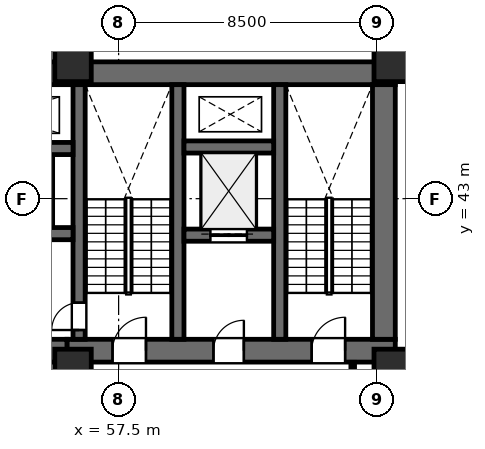
"""IFC4 building model, lengths in metres.
Left out: names, types, materials, properties, quantities, classifications, styles, units other than length and angle.
Written with IfcOpenShell. Run it as: python <this file> out.ifc"""

import sys

from ifc_helpers import new_model, si_unit, direction, frame, frame_2d, origin, origin_2d, place, context, subcontext, project, spatial, rectangle, extrude, element, fill, save


model = new_model("IFC4")
c1 = context("Model", 3, precision=1e-05, world=origin(), true_north=direction((0.0, 1.0)))
c2 = subcontext(c1, "Body", "Model", "MODEL_VIEW")
j1 = project(units=[si_unit("LENGTHUNIT", "METRE"), si_unit("PLANEANGLEUNIT", "RADIAN")], contexts=[c1])
p1 = place(None, origin())
s1 = spatial("IfcSite", under=j1, at=p1, CompositionType="ELEMENT")
p2 = place(p1, origin())
s2 = spatial("IfcBuilding", under=s1, at=p2, CompositionType="ELEMENT")
p3 = place(p2, frame((0.0, 0.0, 61.5)))
s3 = spatial("IfcBuildingStorey", under=s2, at=p3, CompositionType="ELEMENT", Elevation=61.5)
p4 = place(p3, frame((22.9, 47.125, 0.0), z_axis=(0.0, 0.0, 1.0), x_axis=(1.0, 0.0, 0.0)))
e1 = element("IfcWall", 1, at=p4, inside=s3, PredefinedType="SHEAR", context=c2, shape_type="SweptSolid", body=[
    extrude(rectangle(XDim=43.7, YDim=0.75, at=frame_2d((21.85, 0.0))), origin(), (0.0, 0.0, 1.0), 4.0),
])
p5 = place(p3, frame((55.8, 38.0, 0.0), z_axis=(0.0, 0.0, 1.0), x_axis=(1.0, 0.0, 0.0)))
e2 = element("IfcWall", 2, at=p5, inside=s3, PredefinedType="SHEAR", context=c2, shape_type="SweptSolid", body=[
    extrude(rectangle(XDim=10.8, YDim=0.75, at=frame_2d((5.4, 0.0))), origin(), (0.0, 0.0, 1.0), 4.0),
])
p6 = place(p5, frame((1.5, 0.0, 0.0)))
e3 = element("IfcOpeningElement", 3, at=p6, cuts=e2, PredefinedType="OPENING", context=c2, shape_type="SweptSolid", body=[
    extrude(rectangle(XDim=1.1, YDim=2.2, at=frame_2d((0.55, 1.1))), frame((0.0, 0.385, 0.0), z_axis=(0.0, -1.0, 0.0), x_axis=(1.0, 0.0, 0.0)), (0.0, 0.0, 1.0), 0.77),
])
p7 = place(p5, frame((4.82, 0.0, 0.0)))
e4 = element("IfcOpeningElement", 4, at=p7, cuts=e2, PredefinedType="OPENING", context=c2, shape_type="SweptSolid", body=[
    extrude(rectangle(XDim=1.0, YDim=2.15, at=frame_2d((0.5, 1.075))), frame((0.0, 0.385, 0.0), z_axis=(0.0, -1.0, 0.0), x_axis=(1.0, 0.0, 0.0)), (0.0, 0.0, 1.0), 0.77),
])
p8 = place(p5, frame((8.05, 0.0, 0.0)))
e5 = element("IfcOpeningElement", 5, at=p8, cuts=e2, PredefinedType="OPENING", context=c2, shape_type="SweptSolid", body=[
    extrude(rectangle(XDim=1.1, YDim=2.2, at=frame_2d((0.55, 1.1))), frame((0.0, 0.385, 0.0), z_axis=(0.0, -1.0, 0.0), x_axis=(1.0, 0.0, 0.0)), (0.0, 0.0, 1.0), 0.77),
])
p9 = place(p3, frame((66.225, 38.375, 0.0), z_axis=(0.0, 0.0, 1.0), x_axis=(0.0, 1.0, 0.0)))
e6 = element("IfcWall", 6, at=p9, inside=s3, PredefinedType="SHEAR", context=c2, shape_type="SweptSolid", body=[
    extrude(rectangle(XDim=8.375, YDim=0.75, at=frame_2d((4.188, 0.0))), origin(), (0.0, 0.0, 1.0), 4.0),
])
for number, where, z_axis, x_axis in (
    (7, (62.8, 38.375, 0.0), (0.0, 0.0, 1.0), (0.0, 1.0, 0.0)),
    (8, (59.45, 38.375, 0.0), (0.0, 0.0, 1.0), (0.0, 1.0, 0.0)),
):
    element("IfcWall", number, at=place(p3, frame(where, z_axis=z_axis, x_axis=x_axis)), inside=s3, PredefinedType="SHEAR", context=c2, shape_type="SweptSolid", body=[
        extrude(rectangle(XDim=8.375, YDim=0.4, at=frame_2d((4.188, 0.0))), origin(), (0.0, 0.0, 1.0), 4.0),
    ])
p10 = place(p3, frame((56.2, 38.375, 0.0), z_axis=(0.0, 0.0, 1.0), x_axis=(0.0, 1.0, 0.0)))
e9 = element("IfcWall", 9, at=p10, inside=s3, PredefinedType="SHEAR", context=c2, shape_type="SweptSolid", body=[
    extrude(rectangle(XDim=8.375, YDim=0.4, at=frame_2d((4.188, 0.0))), origin(), (0.0, 0.0, 1.0), 4.0),
])
p11 = place(p10, frame((0.305, 0.0, 0.0)))
e10 = element("IfcOpeningElement", 10, at=p11, cuts=e9, PredefinedType="OPENING", context=c2, shape_type="SweptSolid", body=[
    extrude(rectangle(XDim=0.9, YDim=2.15, at=frame_2d((0.45, 1.075))), frame((0.0, 0.21, 0.0), z_axis=(0.0, -1.0, 0.0), x_axis=(1.0, 0.0, 0.0)), (0.0, 0.0, 1.0), 0.42),
])
p12 = place(p3, frame((59.65, 41.8, 0.0), z_axis=(0.0, 0.0, 1.0), x_axis=(1.0, 0.0, 0.0)))
e11 = element("IfcWall", 11, at=p12, inside=s3, PredefinedType="SHEAR", context=c2, shape_type="SweptSolid", body=[
    extrude(rectangle(XDim=2.95, YDim=0.4, at=frame_2d((1.475, 0.0))), origin(), (0.0, 0.0, 1.0), 4.0),
])
p13 = place(p12, frame((0.87, 0.0, 0.0)))
e12 = element("IfcOpeningElement", 12, at=p13, cuts=e11, PredefinedType="OPENING", context=c2, shape_type="SweptSolid", body=[
    extrude(rectangle(XDim=1.2, YDim=2.2, at=frame_2d((0.6, 1.1))), frame((0.0, 0.21, 0.0), z_axis=(0.0, -1.0, 0.0), x_axis=(1.0, 0.0, 0.0)), (0.0, 0.0, 1.0), 0.42),
])
p14 = place(p3, frame((59.65, 44.7, 0.0), z_axis=(0.0, 0.0, 1.0), x_axis=(1.0, 0.0, 0.0)))
e13 = element("IfcWall", 13, at=p14, inside=s3, PredefinedType="SHEAR", context=c2, shape_type="SweptSolid", body=[
    extrude(rectangle(XDim=2.95, YDim=0.4, at=frame_2d((1.475, 0.0))), origin(), (0.0, 0.0, 1.0), 4.0),
])
p15 = place(p3, frame((50.8, 38.0, 0.0), z_axis=(0.0, 0.0, 1.0), x_axis=(1.0, 0.0, 0.0)))
e14 = element("IfcWall", 14, at=p15, inside=s3, PredefinedType="SHEAR", context=c2, shape_type="SweptSolid", body=[
    extrude(rectangle(XDim=5.0, YDim=0.75, at=frame_2d((2.5, 0.0))), origin(), (0.0, 0.0, 1.0), 4.0),
])
p16 = place(p15, frame((2.0, 0.0, 0.0)))
e15 = element("IfcOpeningElement", 15, at=p16, cuts=e14, PredefinedType="OPENING", context=c2, shape_type="SweptSolid", body=[
    extrude(rectangle(XDim=1.2, YDim=2.2, at=frame_2d((0.6, 1.1))), frame((0.0, 0.385, 0.0), z_axis=(0.0, -1.0, 0.0), x_axis=(1.0, 0.0, 0.0)), (0.0, 0.0, 1.0), 0.77),
])
p17 = place(p3, frame((51.25, 41.85, 0.0), z_axis=(0.0, 0.0, 1.0), x_axis=(1.0, 0.0, 0.0)))
e16 = element("IfcWall", 16, at=p17, inside=s3, PredefinedType="SHEAR", context=c2, shape_type="SweptSolid", body=[
    extrude(rectangle(XDim=4.75, YDim=0.4, at=frame_2d((2.375, 0.0))), origin(), (0.0, 0.0, 1.0), 4.0),
])
p18 = place(p17, frame((0.5, 0.0, 0.0)))
e17 = element("IfcOpeningElement", 17, at=p18, cuts=e16, PredefinedType="OPENING", context=c2, shape_type="SweptSolid", body=[
    extrude(rectangle(XDim=1.2, YDim=2.2, at=frame_2d((0.6, 1.1))), frame((0.0, 0.21, 0.0), z_axis=(0.0, -1.0, 0.0), x_axis=(1.0, 0.0, 0.0)), (0.0, 0.0, 1.0), 0.42),
])
p19 = place(p17, frame((2.6, 0.0, 0.0)))
e18 = element("IfcOpeningElement", 18, at=p19, cuts=e16, PredefinedType="OPENING", context=c2, shape_type="SweptSolid", body=[
    extrude(rectangle(XDim=1.2, YDim=2.2, at=frame_2d((0.6, 1.1))), frame((0.0, 0.21, 0.0), z_axis=(0.0, -1.0, 0.0), x_axis=(1.0, 0.0, 0.0)), (0.0, 0.0, 1.0), 0.42),
])
p20 = place(p3, frame((51.25, 44.65, 0.0), z_axis=(0.0, 0.0, 1.0), x_axis=(1.0, 0.0, 0.0)))
e19 = element("IfcWall", 19, at=p20, inside=s3, PredefinedType="SHEAR", context=c2, shape_type="SweptSolid", body=[
    extrude(rectangle(XDim=4.75, YDim=0.4, at=frame_2d((2.375, 0.0))), origin(), (0.0, 0.0, 1.0), 4.0),
])
for number, where, z_axis, x_axis in (
    (20, (66.5, 47.55, 0.0), (0.0, 0.0, 1.0), (1.0, 0.0, 0.0)),
    (21, (56.0, 47.55, 0.0), (0.0, 0.0, 1.0), (1.0, 0.0, 0.0)),
    (22, (66.5, 37.35, 0.0), (0.0, 0.0, 1.0), (1.0, 0.0, 0.0)),
    (23, (56.0, 37.35, 0.0), (0.0, 0.0, 1.0), (1.0, 0.0, 0.0)),
):
    element("IfcColumn", number, at=place(p3, frame(where, z_axis=z_axis, x_axis=x_axis)), inside=s3, PredefinedType="COLUMN", context=c2, shape_type="SweptSolid", body=[
        extrude(rectangle(XDim=1.2, YDim=1.4, at=origin_2d()), origin(), (0.0, 0.0, 1.0), 4.0),
    ])
p21 = place(p3, frame((68.375, 37.8, 0.0), z_axis=(0.0, 0.0, 1.0), x_axis=(-0.139174610616, -0.990267856572, 0.0)))
e24 = element("IfcWall", 24, at=p21, inside=s3, PredefinedType="STANDARD", context=c2, shape_type="SweptSolid", body=[
    extrude(rectangle(XDim=34.6, YDim=0.28, at=frame_2d((17.3, 0.0))), origin(), (0.0, 0.0, 1.0), 3.74),
])
p22 = place(p21, frame((8.935, 0.0, 0.0)))
e25 = element("IfcOpeningElement", 25, at=p22, cuts=e24, PredefinedType="OPENING", context=c2, shape_type="SweptSolid", body=[
    extrude(rectangle(XDim=1.0, YDim=2.15, at=frame_2d((0.5, 1.075))), frame((0.0, 0.15, 0.0), z_axis=(0.0, -1.0, 0.0), x_axis=(1.0, 0.0, 0.0)), (0.0, 0.0, 1.0), 0.3),
])
p23 = place(p21, frame((4.333, 0.0, 0.65)))
e26 = element("IfcOpeningElement", 26, at=p23, cuts=e24, PredefinedType="OPENING", context=c2, shape_type="SweptSolid", body=[
    extrude(rectangle(XDim=1.8, YDim=2.1, at=frame_2d((0.9, 1.05))), frame((0.0, 0.15, 0.0), z_axis=(0.0, -1.0, 0.0), x_axis=(1.0, 0.0, 0.0)), (0.0, 0.0, 1.0), 0.3),
])
p24 = place(p21, frame((22.104, 0.0, 0.65)))
e27 = element("IfcOpeningElement", 27, at=p24, cuts=e24, PredefinedType="OPENING", context=c2, shape_type="SweptSolid", body=[
    extrude(rectangle(XDim=1.8, YDim=2.1, at=frame_2d((0.9, 1.05))), frame((0.0, 0.15, 0.0), z_axis=(0.0, -1.0, 0.0), x_axis=(1.0, 0.0, 0.0)), (0.0, 0.0, 1.0), 0.3),
])
p25 = place(p3, frame((65.2, 34.4, 0.0), z_axis=(0.0, 0.0, 1.0), x_axis=(0.0, 1.0, 0.0)))
e28 = element("IfcWall", 28, at=p25, inside=s3, PredefinedType="PARTITIONING", context=c2, shape_type="SweptSolid", body=[
    extrude(rectangle(XDim=3.217, YDim=0.12, at=frame_2d((1.608, 0.0))), origin(), (0.0, 0.0, 1.0), 2.813),
])
p26 = place(p6, origin())
e29 = element("IfcDoor", 29, at=p26, inside=s3, OperationType="SINGLE_SWING_RIGHT", PredefinedType="DOOR", context=c2, shape_type="SweptSolid", body=[
    extrude(rectangle(XDim=1.1, YDim=2.2, at=frame_2d((0.55, 1.1))), frame((0.0, 0.025, 0.0), z_axis=(0.0, -1.0, 0.0), x_axis=(1.0, 0.0, 0.0)), (0.0, 0.0, 1.0), 0.05),
])
fill(e3, e29)
p27 = place(p7, origin())
e30 = element("IfcDoor", 30, at=p27, inside=s3, OperationType="SINGLE_SWING_RIGHT", PredefinedType="DOOR", context=c2, shape_type="SweptSolid", body=[
    extrude(rectangle(XDim=1.0, YDim=2.15, at=frame_2d((0.5, 1.075))), frame((0.0, 0.025, 0.0), z_axis=(0.0, -1.0, 0.0), x_axis=(1.0, 0.0, 0.0)), (0.0, 0.0, 1.0), 0.05),
])
fill(e4, e30)
p28 = place(p8, origin())
e31 = element("IfcDoor", 31, at=p28, inside=s3, OperationType="SINGLE_SWING_RIGHT", PredefinedType="DOOR", context=c2, shape_type="SweptSolid", body=[
    extrude(rectangle(XDim=1.1, YDim=2.2, at=frame_2d((0.55, 1.1))), frame((0.0, 0.025, 0.0), z_axis=(0.0, -1.0, 0.0), x_axis=(1.0, 0.0, 0.0)), (0.0, 0.0, 1.0), 0.05),
])
fill(e5, e31)
p29 = place(p11, origin())
e32 = element("IfcDoor", 32, at=p29, inside=s3, OperationType="SINGLE_SWING_LEFT", PredefinedType="DOOR", context=c2, shape_type="SweptSolid", body=[
    extrude(rectangle(XDim=0.9, YDim=2.15, at=frame_2d((0.45, 1.075))), frame((0.0, 0.025, 0.0), z_axis=(0.0, -1.0, 0.0), x_axis=(1.0, 0.0, 0.0)), (0.0, 0.0, 1.0), 0.05),
])
fill(e10, e32)
p30 = place(p13, origin())
e33 = element("IfcDoor", 33, at=p30, inside=s3, OperationType="DOUBLE_DOOR_SLIDING", PredefinedType="DOOR", context=c2, shape_type="SweptSolid", body=[
    extrude(rectangle(XDim=1.2, YDim=2.2, at=frame_2d((0.6, 1.1))), frame((0.0, 0.025, 0.0), z_axis=(0.0, -1.0, 0.0), x_axis=(1.0, 0.0, 0.0)), (0.0, 0.0, 1.0), 0.05),
])
fill(e12, e33)
save(model, sys.argv[1])
